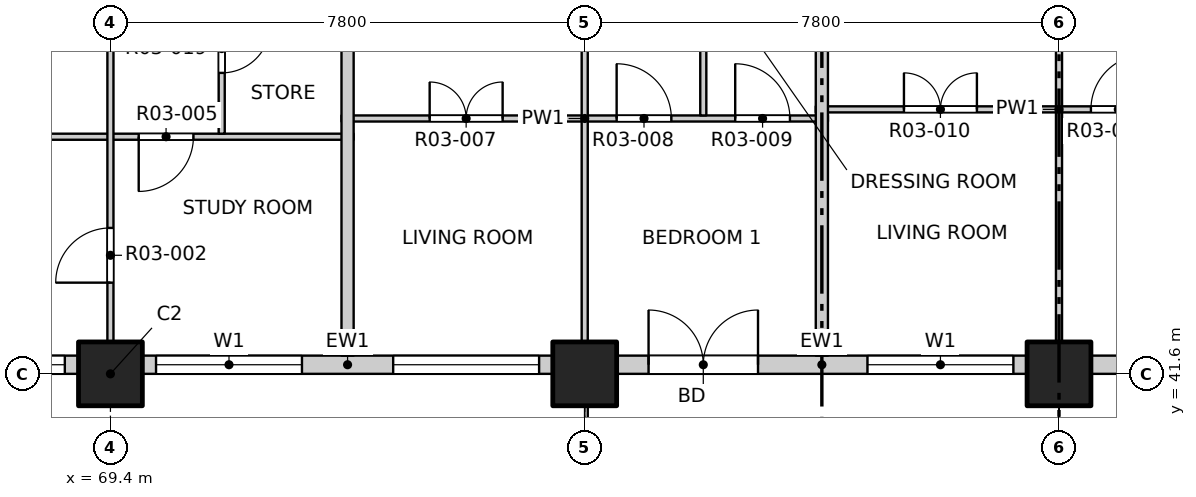
"""IFC4 building model, lengths in metres.
Left out: names, types, materials, properties, quantities, classifications, styles, units other than length and angle.
Written with IfcOpenShell. Run it as: python <this file> out.ifc"""

import sys

from ifc_helpers import new_model, si_unit, direction, frame, frame_2d, origin, origin_2d, place, context, subcontext, project, spatial, rectangle, extrude, element, fill, save


model = new_model("IFC4")
c1 = context("Model", 3, precision=1e-05, world=origin(), true_north=direction((0.0, 1.0)))
c2 = subcontext(c1, "Body", "Model", "MODEL_VIEW")
j1 = project(units=[si_unit("LENGTHUNIT", "METRE"), si_unit("PLANEANGLEUNIT", "RADIAN")], contexts=[c1])
p1 = place(None, origin())
s1 = spatial("IfcSite", under=j1, at=p1, CompositionType="ELEMENT")
p2 = place(p1, origin())
s2 = spatial("IfcBuilding", under=s1, at=p2, CompositionType="ELEMENT")
p3 = place(p2, frame((0.0, 0.0, 43.3)))
s3 = spatial("IfcBuildingStorey", under=s2, at=p3, CompositionType="ELEMENT", Elevation=43.3)
for number, where, z_axis, x_axis in (
    (1, (69.4, 41.6, -0.25), (0.0, 0.0, 1.0), (1.0, 0.0, 0.0)),
    (2, (77.2, 41.6, -0.25), (0.0, 0.0, 1.0), (1.0, 0.0, 0.0)),
    (3, (85.0, 41.6, -0.25), (0.0, 0.0, 1.0), (1.0, 0.0, 0.0)),
):
    element("IfcColumn", number, at=place(p3, frame(where, z_axis=z_axis, x_axis=x_axis)), inside=s3, PredefinedType="COLUMN", context=c2, shape_type="SweptSolid", body=[
        extrude(rectangle(XDim=1.05, YDim=1.05, at=origin_2d()), origin(), (0.0, 0.0, 1.0), 3.35),
    ])
p4 = place(p3, frame((65.5, 41.75, 0.0), z_axis=(0.0, 0.0, 1.0), x_axis=(1.0, 0.0, 0.0)))
e4 = element("IfcWall", 4, at=p4, inside=s3, PredefinedType="SOLIDWALL", context=c2, shape_type="SweptSolid", body=[
    extrude(rectangle(XDim=3.375, YDim=0.3, at=frame_2d((1.688, 0.0))), origin(), (0.0, 0.0, 1.0), 3.1),
])
p5 = place(p4, frame((0.75, 0.0, 0.9)))
e5 = element("IfcOpeningElement", 5, at=p5, cuts=e4, PredefinedType="OPENING", context=c2, shape_type="SweptSolid", body=[
    extrude(rectangle(XDim=2.4, YDim=1.8, at=frame_2d((1.2, 0.9))), frame((0.0, 0.16, 0.0), z_axis=(0.0, -1.0, 0.0), x_axis=(1.0, 0.0, 0.0)), (0.0, 0.0, 1.0), 0.32),
])
p6 = place(p3, frame((69.925, 41.75, 0.0), z_axis=(0.0, 0.0, 1.0), x_axis=(1.0, 0.0, 0.0)))
e6 = element("IfcWall", 6, at=p6, inside=s3, PredefinedType="SOLIDWALL", context=c2, shape_type="SweptSolid", body=[
    extrude(rectangle(XDim=6.75, YDim=0.3, at=frame_2d((3.375, 0.0))), origin(), (0.0, 0.0, 1.0), 3.1),
])
p7 = place(p6, frame((0.225, 0.0, 0.9)))
e7 = element("IfcOpeningElement", 7, at=p7, cuts=e6, PredefinedType="OPENING", context=c2, shape_type="SweptSolid", body=[
    extrude(rectangle(XDim=2.4, YDim=1.8, at=frame_2d((1.2, 0.9))), frame((0.0, 0.16, 0.0), z_axis=(0.0, -1.0, 0.0), x_axis=(1.0, 0.0, 0.0)), (0.0, 0.0, 1.0), 0.32),
])
p8 = place(p6, frame((4.125, 0.0, 0.9)))
e8 = element("IfcOpeningElement", 8, at=p8, cuts=e6, PredefinedType="OPENING", context=c2, shape_type="SweptSolid", body=[
    extrude(rectangle(XDim=2.4, YDim=1.8, at=frame_2d((1.2, 0.9))), frame((0.0, 0.16, 0.0), z_axis=(0.0, -1.0, 0.0), x_axis=(1.0, 0.0, 0.0)), (0.0, 0.0, 1.0), 0.32),
])
p9 = place(p3, frame((77.725, 41.75, 0.0), z_axis=(0.0, 0.0, 1.0), x_axis=(1.0, 0.0, 0.0)))
e9 = element("IfcWall", 9, at=p9, inside=s3, PredefinedType="SOLIDWALL", context=c2, shape_type="SweptSolid", body=[
    extrude(rectangle(XDim=6.75, YDim=0.3, at=frame_2d((3.375, 0.0))), origin(), (0.0, 0.0, 1.0), 3.1),
])
p10 = place(p9, frame((0.525, 0.0, 0.0)))
e10 = element("IfcOpeningElement", 10, at=p10, cuts=e9, PredefinedType="OPENING", context=c2, shape_type="SweptSolid", body=[
    extrude(rectangle(XDim=1.8, YDim=2.4, at=frame_2d((0.9, 1.2))), frame((0.0, 0.16, 0.0), z_axis=(0.0, -1.0, 0.0), x_axis=(1.0, 0.0, 0.0)), (0.0, 0.0, 1.0), 0.32),
])
p11 = place(p9, frame((4.125, 0.0, 0.9)))
e11 = element("IfcOpeningElement", 11, at=p11, cuts=e9, PredefinedType="OPENING", context=c2, shape_type="SweptSolid", body=[
    extrude(rectangle(XDim=2.4, YDim=1.8, at=frame_2d((1.2, 0.9))), frame((0.0, 0.16, 0.0), z_axis=(0.0, -1.0, 0.0), x_axis=(1.0, 0.0, 0.0)), (0.0, 0.0, 1.0), 0.32),
])
p12 = place(p3, frame((85.525, 41.75, 0.0), z_axis=(0.0, 0.0, 1.0), x_axis=(1.0, 0.0, 0.0)))
e12 = element("IfcWall", 12, at=p12, inside=s3, PredefinedType="SOLIDWALL", context=c2, shape_type="SweptSolid", body=[
    extrude(rectangle(XDim=6.75, YDim=0.3, at=frame_2d((3.375, 0.0))), origin(), (0.0, 0.0, 1.0), 3.1),
])
p13 = place(p12, frame((0.525, 0.0, 0.0)))
e13 = element("IfcOpeningElement", 13, at=p13, cuts=e12, PredefinedType="OPENING", context=c2, shape_type="SweptSolid", body=[
    extrude(rectangle(XDim=1.8, YDim=2.4, at=frame_2d((0.9, 1.2))), frame((0.0, 0.16, 0.0), z_axis=(0.0, -1.0, 0.0), x_axis=(1.0, 0.0, 0.0)), (0.0, 0.0, 1.0), 0.32),
])
p14 = place(p12, frame((4.125, 0.0, 0.9)))
e14 = element("IfcOpeningElement", 14, at=p14, cuts=e12, PredefinedType="OPENING", context=c2, shape_type="SweptSolid", body=[
    extrude(rectangle(XDim=2.4, YDim=1.8, at=frame_2d((1.2, 0.9))), frame((0.0, 0.16, 0.0), z_axis=(0.0, -1.0, 0.0), x_axis=(1.0, 0.0, 0.0)), (0.0, 0.0, 1.0), 0.32),
])
p15 = place(p3, frame((61.9, 45.5, 0.0), z_axis=(0.0, 0.0, 1.0), x_axis=(1.0, 0.0, 0.0)))
e15 = element("IfcWall", 15, at=p15, inside=s3, PredefinedType="PARTITIONING", context=c2, shape_type="SweptSolid", body=[
    extrude(rectangle(XDim=11.5, YDim=0.1, at=frame_2d((5.75, 0.0))), origin(), (0.0, 0.0, 1.0), 3.1),
])
p16 = place(p15, frame((7.965, 0.0, 0.0)))
e16 = element("IfcOpeningElement", 16, at=p16, cuts=e15, PredefinedType="OPENING", context=c2, shape_type="SweptSolid", body=[
    extrude(rectangle(XDim=0.9, YDim=2.1, at=frame_2d((0.45, 1.05))), frame((0.0, 0.06, 0.0), z_axis=(0.0, -1.0, 0.0), x_axis=(1.0, 0.0, 0.0)), (0.0, 0.0, 1.0), 0.12),
])
p17 = place(p3, frame((73.2, 45.8, 0.0), z_axis=(0.0, 0.0, 1.0), x_axis=(1.0, 0.0, 0.0)))
e17 = element("IfcWall", 17, at=p17, inside=s3, PredefinedType="PARTITIONING", context=c2, shape_type="SweptSolid", body=[
    extrude(rectangle(XDim=8.0, YDim=0.1, at=frame_2d((4.0, 0.0))), origin(), (0.0, 0.0, 1.0), 3.1),
])
p18 = place(p17, frame((1.45, 0.0, 0.0)))
e18 = element("IfcOpeningElement", 18, at=p18, cuts=e17, PredefinedType="OPENING", context=c2, shape_type="SweptSolid", body=[
    extrude(rectangle(XDim=1.2, YDim=2.1, at=frame_2d((0.6, 1.05))), frame((0.0, 0.06, 0.0), z_axis=(0.0, -1.0, 0.0), x_axis=(1.0, 0.0, 0.0)), (0.0, 0.0, 1.0), 0.12),
])
p19 = place(p17, frame((4.525, 0.0, 0.0)))
e19 = element("IfcOpeningElement", 19, at=p19, cuts=e17, PredefinedType="OPENING", context=c2, shape_type="SweptSolid", body=[
    extrude(rectangle(XDim=0.9, YDim=2.1, at=frame_2d((0.45, 1.05))), frame((0.0, 0.06, 0.0), z_axis=(0.0, -1.0, 0.0), x_axis=(1.0, 0.0, 0.0)), (0.0, 0.0, 1.0), 0.12),
])
p20 = place(p17, frame((6.475, 0.0, 0.0)))
e20 = element("IfcOpeningElement", 20, at=p20, cuts=e17, PredefinedType="OPENING", context=c2, shape_type="SweptSolid", body=[
    extrude(rectangle(XDim=0.9, YDim=2.1, at=frame_2d((0.45, 1.05))), frame((0.0, 0.06, 0.0), z_axis=(0.0, -1.0, 0.0), x_axis=(1.0, 0.0, 0.0)), (0.0, 0.0, 1.0), 0.12),
])
p21 = place(p3, frame((81.0, 45.95, 0.0), z_axis=(0.0, 0.0, 1.0), x_axis=(1.0, 0.0, 0.0)))
e21 = element("IfcWall", 21, at=p21, inside=s3, PredefinedType="PARTITIONING", context=c2, shape_type="SweptSolid", body=[
    extrude(rectangle(XDim=8.0, YDim=0.1, at=frame_2d((4.0, 0.0))), origin(), (0.0, 0.0, 1.0), 3.1),
])
p22 = place(p21, frame((1.45, 0.0, 0.0)))
e22 = element("IfcOpeningElement", 22, at=p22, cuts=e21, PredefinedType="OPENING", context=c2, shape_type="SweptSolid", body=[
    extrude(rectangle(XDim=1.2, YDim=2.1, at=frame_2d((0.6, 1.05))), frame((0.0, 0.06, 0.0), z_axis=(0.0, -1.0, 0.0), x_axis=(1.0, 0.0, 0.0)), (0.0, 0.0, 1.0), 0.12),
])
p23 = place(p21, frame((4.525, 0.0, 0.0)))
e23 = element("IfcOpeningElement", 23, at=p23, cuts=e21, PredefinedType="OPENING", context=c2, shape_type="SweptSolid", body=[
    extrude(rectangle(XDim=0.9, YDim=2.1, at=frame_2d((0.45, 1.05))), frame((0.0, 0.06, 0.0), z_axis=(0.0, -1.0, 0.0), x_axis=(1.0, 0.0, 0.0)), (0.0, 0.0, 1.0), 0.12),
])
p24 = place(p21, frame((6.475, 0.0, 0.0)))
e24 = element("IfcOpeningElement", 24, at=p24, cuts=e21, PredefinedType="OPENING", context=c2, shape_type="SweptSolid", body=[
    extrude(rectangle(XDim=0.9, YDim=2.1, at=frame_2d((0.45, 1.05))), frame((0.0, 0.06, 0.0), z_axis=(0.0, -1.0, 0.0), x_axis=(1.0, 0.0, 0.0)), (0.0, 0.0, 1.0), 0.12),
])
p25 = place(p3, frame((69.4, 41.9, 0.0), z_axis=(0.0, 0.0, 1.0), x_axis=(0.0, 1.0, 0.0)))
e25 = element("IfcWall", 25, at=p25, inside=s3, PredefinedType="PARTITIONING", context=c2, shape_type="SweptSolid", body=[
    extrude(rectangle(XDim=46.2, YDim=0.1, at=frame_2d((23.1, 0.0))), origin(), (0.0, 0.0, 1.0), 3.1),
])
p26 = place(p25, frame((1.2, 0.0, 0.0)))
e26 = element("IfcOpeningElement", 26, at=p26, cuts=e25, PredefinedType="OPENING", context=c2, shape_type="SweptSolid", body=[
    extrude(rectangle(XDim=0.9, YDim=2.1, at=frame_2d((0.45, 1.05))), frame((0.0, 0.06, 0.0), z_axis=(0.0, -1.0, 0.0), x_axis=(1.0, 0.0, 0.0)), (0.0, 0.0, 1.0), 0.12),
])
p27 = place(p25, frame((5.9, 0.0, 0.0)))
e27 = element("IfcOpeningElement", 27, at=p27, cuts=e25, PredefinedType="OPENING", context=c2, shape_type="SweptSolid", body=[
    extrude(rectangle(XDim=0.9, YDim=2.1, at=frame_2d((0.45, 1.05))), frame((0.0, 0.06, 0.0), z_axis=(0.0, -1.0, 0.0), x_axis=(1.0, 0.0, 0.0)), (0.0, 0.0, 1.0), 0.12),
])
p28 = place(p25, frame((9.0, 0.0, 0.0)))
e28 = element("IfcOpeningElement", 28, at=p28, cuts=e25, PredefinedType="OPENING", context=c2, shape_type="SweptSolid", body=[
    extrude(rectangle(XDim=0.9, YDim=2.1, at=frame_2d((0.45, 1.05))), frame((0.0, 0.06, 0.0), z_axis=(0.0, -1.0, 0.0), x_axis=(1.0, 0.0, 0.0)), (0.0, 0.0, 1.0), 0.12),
])
p29 = place(p25, frame((13.725, 0.0, 0.0)))
e29 = element("IfcOpeningElement", 29, at=p29, cuts=e25, PredefinedType="OPENING", context=c2, shape_type="SweptSolid", body=[
    extrude(rectangle(XDim=0.9, YDim=2.1, at=frame_2d((0.45, 1.05))), frame((0.0, 0.06, 0.0), z_axis=(0.0, -1.0, 0.0), x_axis=(1.0, 0.0, 0.0)), (0.0, 0.0, 1.0), 0.12),
])
p30 = place(p25, frame((17.775, 0.0, 0.0)))
e30 = element("IfcOpeningElement", 30, at=p30, cuts=e25, PredefinedType="OPENING", context=c2, shape_type="SweptSolid", body=[
    extrude(rectangle(XDim=0.9, YDim=2.1, at=frame_2d((0.45, 1.05))), frame((0.0, 0.06, 0.0), z_axis=(0.0, -1.0, 0.0), x_axis=(1.0, 0.0, 0.0)), (0.0, 0.0, 1.0), 0.12),
])
p31 = place(p25, frame((20.7, 0.0, 0.0)))
e31 = element("IfcOpeningElement", 31, at=p31, cuts=e25, PredefinedType="OPENING", context=c2, shape_type="SweptSolid", body=[
    extrude(rectangle(XDim=0.9, YDim=2.1, at=frame_2d((0.45, 1.05))), frame((0.0, 0.06, 0.0), z_axis=(0.0, -1.0, 0.0), x_axis=(1.0, 0.0, 0.0)), (0.0, 0.0, 1.0), 0.12),
])
p32 = place(p25, frame((25.575, 0.0, 0.0)))
e32 = element("IfcOpeningElement", 32, at=p32, cuts=e25, PredefinedType="OPENING", context=c2, shape_type="SweptSolid", body=[
    extrude(rectangle(XDim=0.9, YDim=2.1, at=frame_2d((0.45, 1.05))), frame((0.0, 0.06, 0.0), z_axis=(0.0, -1.0, 0.0), x_axis=(1.0, 0.0, 0.0)), (0.0, 0.0, 1.0), 0.12),
])
p33 = place(p25, frame((28.5, 0.0, 0.0)))
e33 = element("IfcOpeningElement", 33, at=p33, cuts=e25, PredefinedType="OPENING", context=c2, shape_type="SweptSolid", body=[
    extrude(rectangle(XDim=0.9, YDim=2.1, at=frame_2d((0.45, 1.05))), frame((0.0, 0.06, 0.0), z_axis=(0.0, -1.0, 0.0), x_axis=(1.0, 0.0, 0.0)), (0.0, 0.0, 1.0), 0.12),
])
p34 = place(p25, frame((33.375, 0.0, 0.0)))
e34 = element("IfcOpeningElement", 34, at=p34, cuts=e25, PredefinedType="OPENING", context=c2, shape_type="SweptSolid", body=[
    extrude(rectangle(XDim=0.9, YDim=2.1, at=frame_2d((0.45, 1.05))), frame((0.0, 0.06, 0.0), z_axis=(0.0, -1.0, 0.0), x_axis=(1.0, 0.0, 0.0)), (0.0, 0.0, 1.0), 0.12),
])
p35 = place(p25, frame((36.3, 0.0, 0.0)))
e35 = element("IfcOpeningElement", 35, at=p35, cuts=e25, PredefinedType="OPENING", context=c2, shape_type="SweptSolid", body=[
    extrude(rectangle(XDim=0.9, YDim=2.1, at=frame_2d((0.45, 1.05))), frame((0.0, 0.06, 0.0), z_axis=(0.0, -1.0, 0.0), x_axis=(1.0, 0.0, 0.0)), (0.0, 0.0, 1.0), 0.12),
])
p36 = place(p25, frame((40.2, 0.0, 0.0)))
e36 = element("IfcOpeningElement", 36, at=p36, cuts=e25, PredefinedType="OPENING", context=c2, shape_type="SweptSolid", body=[
    extrude(rectangle(XDim=0.9, YDim=2.1, at=frame_2d((0.45, 1.05))), frame((0.0, 0.06, 0.0), z_axis=(0.0, -1.0, 0.0), x_axis=(1.0, 0.0, 0.0)), (0.0, 0.0, 1.0), 0.12),
])
p37 = place(p25, frame((44.1, 0.0, 0.0)))
e37 = element("IfcOpeningElement", 37, at=p37, cuts=e25, PredefinedType="OPENING", context=c2, shape_type="SweptSolid", body=[
    extrude(rectangle(XDim=0.9, YDim=2.1, at=frame_2d((0.45, 1.05))), frame((0.0, 0.06, 0.0), z_axis=(0.0, -1.0, 0.0), x_axis=(1.0, 0.0, 0.0)), (0.0, 0.0, 1.0), 0.12),
])
p38 = place(p3, frame((71.23, 45.55, 0.0), z_axis=(0.0, 0.0, 1.0), x_axis=(0.0, 1.0, 0.0)))
e38 = element("IfcWall", 38, at=p38, inside=s3, PredefinedType="PARTITIONING", context=c2, shape_type="SweptSolid", body=[
    extrude(rectangle(XDim=12.3, YDim=0.1, at=frame_2d((6.15, 0.0))), origin(), (0.0, 0.0, 1.0), 3.1),
])
p39 = place(p38, frame((1.0, 0.0, 0.0)))
e39 = element("IfcOpeningElement", 39, at=p39, cuts=e38, PredefinedType="OPENING", context=c2, shape_type="SweptSolid", body=[
    extrude(rectangle(XDim=0.8, YDim=2.1, at=frame_2d((0.4, 1.05))), frame((0.0, 0.06, 0.0), z_axis=(0.0, -1.0, 0.0), x_axis=(1.0, 0.0, 0.0)), (0.0, 0.0, 1.0), 0.12),
])
p40 = place(p38, frame((3.35, 0.0, 0.0)))
e40 = element("IfcOpeningElement", 40, at=p40, cuts=e38, PredefinedType="OPENING", context=c2, shape_type="SweptSolid", body=[
    extrude(rectangle(XDim=0.9, YDim=2.1, at=frame_2d((0.45, 1.05))), frame((0.0, 0.06, 0.0), z_axis=(0.0, -1.0, 0.0), x_axis=(1.0, 0.0, 0.0)), (0.0, 0.0, 1.0), 0.12),
])
p41 = place(p38, frame((5.8, 0.0, 0.0)))
e41 = element("IfcOpeningElement", 41, at=p41, cuts=e38, PredefinedType="OPENING", context=c2, shape_type="SweptSolid", body=[
    extrude(rectangle(XDim=0.8, YDim=2.1, at=frame_2d((0.4, 1.05))), frame((0.0, 0.06, 0.0), z_axis=(0.0, -1.0, 0.0), x_axis=(1.0, 0.0, 0.0)), (0.0, 0.0, 1.0), 0.12),
])
p42 = place(p38, frame((8.4, 0.0, 0.0)))
e42 = element("IfcOpeningElement", 42, at=p42, cuts=e38, PredefinedType="OPENING", context=c2, shape_type="SweptSolid", body=[
    extrude(rectangle(XDim=0.8, YDim=2.1, at=frame_2d((0.4, 1.05))), frame((0.0, 0.06, 0.0), z_axis=(0.0, -1.0, 0.0), x_axis=(1.0, 0.0, 0.0)), (0.0, 0.0, 1.0), 0.12),
])
p43 = place(p38, frame((10.7, 0.0, 0.0)))
e43 = element("IfcOpeningElement", 43, at=p43, cuts=e38, PredefinedType="OPENING", context=c2, shape_type="SweptSolid", body=[
    extrude(rectangle(XDim=0.9, YDim=2.1, at=frame_2d((0.45, 1.05))), frame((0.0, 0.06, 0.0), z_axis=(0.0, -1.0, 0.0), x_axis=(1.0, 0.0, 0.0)), (0.0, 0.0, 1.0), 0.12),
])
p44 = place(p3, frame((73.3, 41.9, 0.0), z_axis=(0.0, 0.0, 1.0), x_axis=(0.0, 1.0, 0.0)))
e44 = element("IfcWall", 44, at=p44, inside=s3, PredefinedType="PARTITIONING", context=c2, shape_type="SweptSolid", body=[
    extrude(rectangle(XDim=11.3, YDim=0.2, at=frame_2d((5.65, 0.0))), origin(), (0.0, 0.0, 1.0), 3.1),
])
p45 = place(p3, frame((77.2, 41.9, 0.0), z_axis=(0.0, 0.0, 1.0), x_axis=(0.0, 1.0, 0.0)))
e45 = element("IfcWall", 45, at=p45, inside=s3, PredefinedType="PARTITIONING", context=c2, shape_type="SweptSolid", body=[
    extrude(rectangle(XDim=7.45, YDim=0.1, at=frame_2d((3.725, 0.0))), origin(), (0.0, 0.0, 1.0), 3.1),
])
p46 = place(p3, frame((79.15, 45.85, 0.0), z_axis=(0.0, 0.0, 1.0), x_axis=(0.0, 1.0, 0.0)))
e46 = element("IfcWall", 46, at=p46, inside=s3, PredefinedType="PARTITIONING", context=c2, shape_type="SweptSolid", body=[
    extrude(rectangle(XDim=3.5, YDim=0.1, at=frame_2d((1.75, 0.0))), origin(), (0.0, 0.0, 1.0), 3.1),
])
p47 = place(p3, frame((81.1, 41.9, 0.0), z_axis=(0.0, 0.0, 1.0), x_axis=(0.0, 1.0, 0.0)))
e47 = element("IfcWall", 47, at=p47, inside=s3, PredefinedType="PARTITIONING", context=c2, shape_type="SweptSolid", body=[
    extrude(rectangle(XDim=11.3, YDim=0.2, at=frame_2d((5.65, 0.0))), origin(), (0.0, 0.0, 1.0), 3.1),
])
p48 = place(p3, frame((85.0, 41.9, 0.0), z_axis=(0.0, 0.0, 1.0), x_axis=(0.0, 1.0, 0.0)))
e48 = element("IfcWall", 48, at=p48, inside=s3, PredefinedType="PARTITIONING", context=c2, shape_type="SweptSolid", body=[
    extrude(rectangle(XDim=7.45, YDim=0.1, at=frame_2d((3.725, 0.0))), origin(), (0.0, 0.0, 1.0), 3.1),
])
p49 = place(p5, origin())
e49 = element("IfcWindow", 49, at=p49, inside=s3, PartitioningType="DOUBLE_PANEL_VERTICAL", PredefinedType="WINDOW", context=c2, shape_type="SweptSolid", body=[
    extrude(rectangle(XDim=2.4, YDim=1.8, at=frame_2d((1.2, 0.9))), frame((0.0, 0.03, 0.0), z_axis=(0.0, -1.0, 0.0), x_axis=(1.0, 0.0, 0.0)), (0.0, 0.0, 1.0), 0.06),
])
fill(e5, e49)
p50 = place(p7, origin())
e50 = element("IfcWindow", 50, at=p50, inside=s3, PartitioningType="DOUBLE_PANEL_VERTICAL", PredefinedType="WINDOW", context=c2, shape_type="SweptSolid", body=[
    extrude(rectangle(XDim=2.4, YDim=1.8, at=frame_2d((1.2, 0.9))), frame((0.0, 0.03, 0.0), z_axis=(0.0, -1.0, 0.0), x_axis=(1.0, 0.0, 0.0)), (0.0, 0.0, 1.0), 0.06),
])
fill(e7, e50)
p51 = place(p8, origin())
e51 = element("IfcWindow", 51, at=p51, inside=s3, PartitioningType="DOUBLE_PANEL_VERTICAL", PredefinedType="WINDOW", context=c2, shape_type="SweptSolid", body=[
    extrude(rectangle(XDim=2.4, YDim=1.8, at=frame_2d((1.2, 0.9))), frame((0.0, 0.03, 0.0), z_axis=(0.0, -1.0, 0.0), x_axis=(1.0, 0.0, 0.0)), (0.0, 0.0, 1.0), 0.06),
])
fill(e8, e51)
p52 = place(p10, origin())
e52 = element("IfcDoor", 52, at=p52, inside=s3, OperationType="DOUBLE_DOOR_SINGLE_SWING", PredefinedType="DOOR", context=c2, shape_type="SweptSolid", body=[
    extrude(rectangle(XDim=1.8, YDim=2.4, at=frame_2d((0.9, 1.2))), frame((0.0, 0.025, 0.0), z_axis=(0.0, -1.0, 0.0), x_axis=(1.0, 0.0, 0.0)), (0.0, 0.0, 1.0), 0.05),
])
fill(e10, e52)
p53 = place(p11, origin())
e53 = element("IfcWindow", 53, at=p53, inside=s3, PartitioningType="DOUBLE_PANEL_VERTICAL", PredefinedType="WINDOW", context=c2, shape_type="SweptSolid", body=[
    extrude(rectangle(XDim=2.4, YDim=1.8, at=frame_2d((1.2, 0.9))), frame((0.0, 0.03, 0.0), z_axis=(0.0, -1.0, 0.0), x_axis=(1.0, 0.0, 0.0)), (0.0, 0.0, 1.0), 0.06),
])
fill(e11, e53)
p54 = place(p26, origin())
e54 = element("IfcDoor", 54, at=p54, inside=s3, OperationType="SINGLE_SWING_LEFT", PredefinedType="DOOR", context=c2, shape_type="SweptSolid", body=[
    extrude(rectangle(XDim=0.9, YDim=2.1, at=frame_2d((0.45, 1.05))), frame((0.0, 0.025, 0.0), z_axis=(0.0, -1.0, 0.0), x_axis=(1.0, 0.0, 0.0)), (0.0, 0.0, 1.0), 0.05),
])
fill(e26, e54)
p55 = place(p16, origin())
e55 = element("IfcDoor", 55, at=p55, inside=s3, OperationType="SINGLE_SWING_RIGHT", PredefinedType="DOOR", context=c2, shape_type="SweptSolid", body=[
    extrude(rectangle(XDim=0.9, YDim=2.1, at=frame_2d((0.45, 1.05))), frame((0.0, 0.025, 0.0), z_axis=(0.0, -1.0, 0.0), x_axis=(1.0, 0.0, 0.0)), (0.0, 0.0, 1.0), 0.05),
])
fill(e16, e55)
p56 = place(p18, origin())
e56 = element("IfcDoor", 56, at=p56, inside=s3, OperationType="DOUBLE_DOOR_SINGLE_SWING", PredefinedType="DOOR", context=c2, shape_type="SweptSolid", body=[
    extrude(rectangle(XDim=1.2, YDim=2.1, at=frame_2d((0.6, 1.05))), frame((0.0, 0.025, 0.0), z_axis=(0.0, -1.0, 0.0), x_axis=(1.0, 0.0, 0.0)), (0.0, 0.0, 1.0), 0.05),
])
fill(e18, e56)
p57 = place(p19, origin())
e57 = element("IfcDoor", 57, at=p57, inside=s3, OperationType="SINGLE_SWING_LEFT", PredefinedType="DOOR", context=c2, shape_type="SweptSolid", body=[
    extrude(rectangle(XDim=0.9, YDim=2.1, at=frame_2d((0.45, 1.05))), frame((0.0, 0.025, 0.0), z_axis=(0.0, -1.0, 0.0), x_axis=(1.0, 0.0, 0.0)), (0.0, 0.0, 1.0), 0.05),
])
fill(e19, e57)
p58 = place(p20, origin())
e58 = element("IfcDoor", 58, at=p58, inside=s3, OperationType="SINGLE_SWING_LEFT", PredefinedType="DOOR", context=c2, shape_type="SweptSolid", body=[
    extrude(rectangle(XDim=0.9, YDim=2.1, at=frame_2d((0.45, 1.05))), frame((0.0, 0.025, 0.0), z_axis=(0.0, -1.0, 0.0), x_axis=(1.0, 0.0, 0.0)), (0.0, 0.0, 1.0), 0.05),
])
fill(e20, e58)
p59 = place(p22, origin())
e59 = element("IfcDoor", 59, at=p59, inside=s3, OperationType="DOUBLE_DOOR_SINGLE_SWING", PredefinedType="DOOR", context=c2, shape_type="SweptSolid", body=[
    extrude(rectangle(XDim=1.2, YDim=2.1, at=frame_2d((0.6, 1.05))), frame((0.0, 0.025, 0.0), z_axis=(0.0, -1.0, 0.0), x_axis=(1.0, 0.0, 0.0)), (0.0, 0.0, 1.0), 0.05),
])
fill(e22, e59)
p60 = place(p23, origin())
e60 = element("IfcDoor", 60, at=p60, inside=s3, OperationType="SINGLE_SWING_RIGHT", PredefinedType="DOOR", context=c2, shape_type="SweptSolid", body=[
    extrude(rectangle(XDim=0.9, YDim=2.1, at=frame_2d((0.45, 1.05))), frame((0.0, 0.025, 0.0), z_axis=(0.0, -1.0, 0.0), x_axis=(1.0, 0.0, 0.0)), (0.0, 0.0, 1.0), 0.05),
])
fill(e23, e60)
p61 = place(p39, origin())
e61 = element("IfcDoor", 61, at=p61, inside=s3, OperationType="SINGLE_SWING_LEFT", PredefinedType="DOOR", context=c2, shape_type="SweptSolid", body=[
    extrude(rectangle(XDim=0.8, YDim=2.1, at=frame_2d((0.4, 1.05))), frame((0.0, 0.025, 0.0), z_axis=(0.0, -1.0, 0.0), x_axis=(1.0, 0.0, 0.0)), (0.0, 0.0, 1.0), 0.05),
])
fill(e39, e61)
save(model, sys.argv[1])
